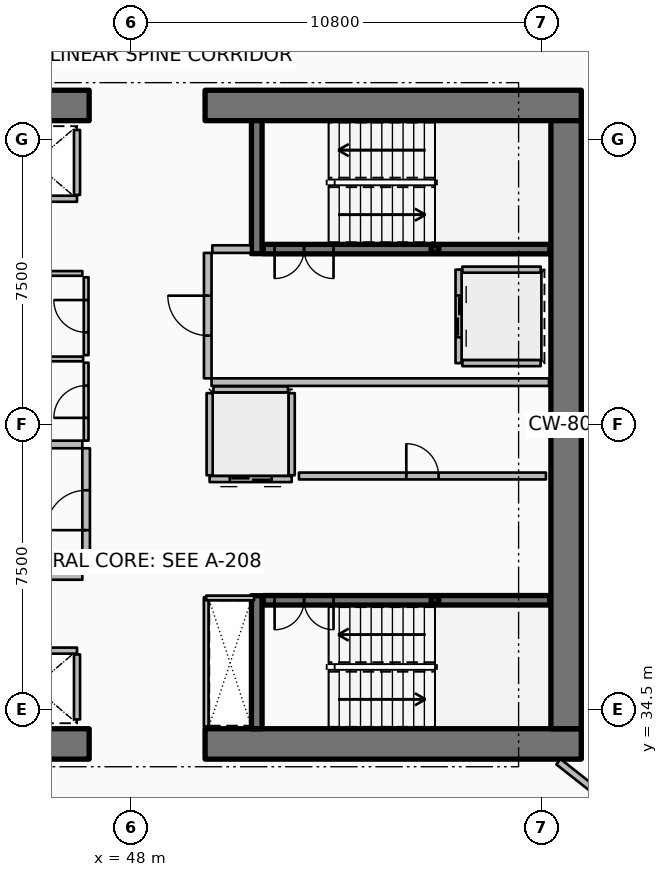
"""IFC4 building model, lengths in metres.
Left out: names, types, materials, properties, quantities, classifications, styles, units other than length and angle.
Written with IfcOpenShell. Run it as: python <this file> out.ifc"""

import sys

from ifc_helpers import new_model, si_unit, direction, frame, frame_2d, origin, origin_2d, place, context, subcontext, project, spatial, rectangle, hollow_rectangle, extrude, element, fill, save


model = new_model("IFC4")
c1 = context("Model", 3, precision=1e-05, world=origin(), true_north=direction((0.0, 1.0)))
c2 = subcontext(c1, "Body", "Model", "MODEL_VIEW")
j1 = project(units=[si_unit("LENGTHUNIT", "METRE"), si_unit("PLANEANGLEUNIT", "RADIAN")], contexts=[c1])
p1 = place(None, origin())
s1 = spatial("IfcSite", under=j1, at=p1, CompositionType="ELEMENT")
p2 = place(p1, origin())
s2 = spatial("IfcBuilding", under=s1, at=p2, CompositionType="ELEMENT")
p3 = place(p2, frame((0.0, 0.0, 131.55)))
s3 = spatial("IfcBuildingStorey", under=s2, at=p3, CompositionType="ELEMENT", Elevation=131.55)
p4 = place(p3, frame((37.0, 33.6, 0.0), z_axis=(0.0, 0.0, 1.0), x_axis=(1.0, 0.0, 0.0)))
e1 = element("IfcWall", 1, at=p4, inside=s3, PredefinedType="SHEAR", context=c2, shape_type="SweptSolid", body=[
    extrude(rectangle(XDim=9.9, YDim=0.8, at=frame_2d((4.95, 0.0))), origin(), (0.0, 0.0, 1.0), 3.75),
])
p5 = place(p3, frame((49.95, 33.6, 0.0), z_axis=(0.0, 0.0, 1.0), x_axis=(1.0, 0.0, 0.0)))
e2 = element("IfcWall", 2, at=p5, inside=s3, PredefinedType="SHEAR", context=c2, shape_type="SweptSolid", body=[
    extrude(rectangle(XDim=9.9, YDim=0.8, at=frame_2d((4.95, 0.0))), origin(), (0.0, 0.0, 1.0), 3.75),
])
p6 = place(p3, frame((37.0, 50.4, 0.0), z_axis=(0.0, 0.0, 1.0), x_axis=(1.0, 0.0, 0.0)))
e3 = element("IfcWall", 3, at=p6, inside=s3, PredefinedType="SHEAR", context=c2, shape_type="SweptSolid", body=[
    extrude(rectangle(XDim=9.9, YDim=0.8, at=frame_2d((4.95, 0.0))), origin(), (0.0, 0.0, 1.0), 3.75),
])
p7 = place(p3, frame((49.95, 50.4, 0.0), z_axis=(0.0, 0.0, 1.0), x_axis=(1.0, 0.0, 0.0)))
e4 = element("IfcWall", 4, at=p7, inside=s3, PredefinedType="SHEAR", context=c2, shape_type="SweptSolid", body=[
    extrude(rectangle(XDim=9.9, YDim=0.8, at=frame_2d((4.95, 0.0))), origin(), (0.0, 0.0, 1.0), 3.75),
])
p8 = place(p3, frame((59.45, 34.0, 0.0), z_axis=(0.0, 0.0, 1.0), x_axis=(0.0, 1.0, 0.0)))
e5 = element("IfcWall", 5, at=p8, inside=s3, PredefinedType="SHEAR", context=c2, shape_type="SweptSolid", body=[
    extrude(rectangle(XDim=16.0, YDim=0.8, at=frame_2d((8.0, 0.0))), origin(), (0.0, 0.0, 1.0), 3.75),
])
for number, where, z_axis, x_axis in (
    (6, (51.31, 46.5, 0.0), (0.0, 0.0, 1.0), (0.0, 1.0, 0.0)),
    (7, (51.31, 34.0, 0.0), (0.0, 0.0, 1.0), (0.0, 1.0, 0.0)),
):
    element("IfcWall", number, at=place(p3, frame(where, z_axis=z_axis, x_axis=x_axis)), inside=s3, PredefinedType="SHEAR", context=c2, shape_type="SweptSolid", body=[
        extrude(rectangle(XDim=3.5, YDim=0.28, at=frame_2d((1.75, 0.0))), origin(), (0.0, 0.0, 1.0), 3.75),
    ])
for number, where, z_axis, x_axis in (
    (8, (56.0, 46.62, 0.0), (0.0, 0.0, 1.0), (1.0, 0.0, 0.0)),
    (9, (56.0, 37.38, 0.0), (0.0, 0.0, 1.0), (1.0, 0.0, 0.0)),
):
    element("IfcColumn", number, at=place(p3, frame(where, z_axis=z_axis, x_axis=x_axis)), inside=s3, PredefinedType="COLUMN", context=c2, shape_type="SweptSolid", body=[
        extrude(hollow_rectangle(XDim=0.2, YDim=0.2, WallThickness=0.01, InnerFilletRadius=0.01, OuterFilletRadius=0.02, at=origin_2d()), origin(), (0.0, 0.0, 1.0), 1.67),
    ])
p9 = place(p3, frame((51.48, 46.62, 0.0), z_axis=(0.0, 0.0, 1.0), x_axis=(1.0, 0.0, 0.0)))
e10 = element("IfcWall", 10, at=p9, inside=s3, PredefinedType="SOLIDWALL", context=c2, shape_type="SweptSolid", body=[
    extrude(rectangle(XDim=7.54, YDim=0.25, at=frame_2d((3.77, 0.0))), origin(), (0.0, 0.0, 1.0), 3.5),
])
p10 = place(p9, frame((0.3, 0.0, 0.0)))
e11 = element("IfcOpeningElement", 11, at=p10, cuts=e10, PredefinedType="OPENING", context=c2, shape_type="SweptSolid", body=[
    extrude(rectangle(XDim=1.55, YDim=2.15, at=frame_2d((0.775, 1.075))), frame((0.0, 0.135, 0.0), z_axis=(0.0, -1.0, 0.0), x_axis=(1.0, 0.0, 0.0)), (0.0, 0.0, 1.0), 0.27),
])
p11 = place(p3, frame((51.48, 37.38, 0.0), z_axis=(0.0, 0.0, 1.0), x_axis=(1.0, 0.0, 0.0)))
e12 = element("IfcWall", 12, at=p11, inside=s3, PredefinedType="SOLIDWALL", context=c2, shape_type="SweptSolid", body=[
    extrude(rectangle(XDim=7.54, YDim=0.25, at=frame_2d((3.77, 0.0))), origin(), (0.0, 0.0, 1.0), 3.5),
])
p12 = place(p11, frame((0.3, 0.0, 0.0)))
e13 = element("IfcOpeningElement", 13, at=p12, cuts=e12, PredefinedType="OPENING", context=c2, shape_type="SweptSolid", body=[
    extrude(rectangle(XDim=1.55, YDim=2.15, at=frame_2d((0.775, 1.075))), frame((0.0, 0.135, 0.0), z_axis=(0.0, -1.0, 0.0), x_axis=(1.0, 0.0, 0.0)), (0.0, 0.0, 1.0), 0.27),
])
p13 = place(p3, frame((46.58, 47.945, 0.0), z_axis=(0.0, 0.0, 1.0), x_axis=(-1.0, 0.0, 0.0)))
e14 = element("IfcWall", 14, at=p13, inside=s3, PredefinedType="PARTITIONING", context=c2, shape_type="SweptSolid", body=[
    extrude(rectangle(XDim=2.26, YDim=0.16, at=frame_2d((1.13, 0.0))), origin(), (0.0, 0.0, 1.0), 3.5),
])
p14 = place(p3, frame((46.58, 48.045, 0.0), z_axis=(0.0, 0.0, 1.0), x_axis=(0.0, 1.0, 0.0)))
e15 = element("IfcWall", 15, at=p14, inside=s3, PredefinedType="PARTITIONING", context=c2, shape_type="SweptSolid", body=[
    extrude(rectangle(XDim=1.71, YDim=0.16, at=frame_2d((0.855, 0.0))), origin(), (0.0, 0.0, 1.0), 3.5),
])
p15 = place(p3, frame((44.32, 36.055, 0.0), z_axis=(0.0, 0.0, 1.0), x_axis=(1.0, 0.0, 0.0)))
e16 = element("IfcWall", 16, at=p15, inside=s3, PredefinedType="PARTITIONING", context=c2, shape_type="SweptSolid", body=[
    extrude(rectangle(XDim=2.26, YDim=0.16, at=frame_2d((1.13, 0.0))), origin(), (0.0, 0.0, 1.0), 3.5),
])
p16 = place(p3, frame((46.58, 34.245, 0.0), z_axis=(0.0, 0.0, 1.0), x_axis=(0.0, 1.0, 0.0)))
e17 = element("IfcWall", 17, at=p16, inside=s3, PredefinedType="PARTITIONING", context=c2, shape_type="SweptSolid", body=[
    extrude(rectangle(XDim=1.71, YDim=0.16, at=frame_2d((0.855, 0.0))), origin(), (0.0, 0.0, 1.0), 3.5),
])
p17 = place(p3, frame((56.62, 46.08, 0.0), z_axis=(0.0, 0.0, 1.0), x_axis=(0.0, -1.0, 0.0)))
e18 = element("IfcWall", 18, at=p17, inside=s3, PredefinedType="PARTITIONING", context=c2, shape_type="SweptSolid", body=[
    extrude(rectangle(XDim=2.46, YDim=0.16, at=frame_2d((1.23, 0.0))), origin(), (0.0, 0.0, 1.0), 3.5),
])
p18 = place(p17, frame((0.68, 0.0, 0.0)))
e19 = element("IfcOpeningElement", 19, at=p18, cuts=e18, PredefinedType="OPENING", context=c2, shape_type="SweptSolid", body=[
    extrude(rectangle(XDim=1.1, YDim=2.1, at=frame_2d((0.55, 1.05))), frame((0.0, 0.09, 0.0), z_axis=(0.0, -1.0, 0.0), x_axis=(1.0, 0.0, 0.0)), (0.0, 0.0, 1.0), 0.18),
])
for number, where, z_axis, x_axis in (
    (20, (56.72, 46.08, 0.0), (0.0, 0.0, 1.0), (1.0, 0.0, 0.0)),
    (21, (56.72, 43.62, 0.0), (0.0, 0.0, 1.0), (1.0, 0.0, 0.0)),
):
    element("IfcWall", number, at=place(p3, frame(where, z_axis=z_axis, x_axis=x_axis)), inside=s3, PredefinedType="PARTITIONING", context=c2, shape_type="SweptSolid", body=[
        extrude(rectangle(XDim=2.06, YDim=0.16, at=frame_2d((1.03, 0.0))), origin(), (0.0, 0.0, 1.0), 3.5),
    ])
p19 = place(p3, frame((52.23, 40.57, 0.0), z_axis=(0.0, 0.0, 1.0), x_axis=(-1.0, 0.0, 0.0)))
e22 = element("IfcWall", 22, at=p19, inside=s3, PredefinedType="PARTITIONING", context=c2, shape_type="SweptSolid", body=[
    extrude(rectangle(XDim=2.16, YDim=0.16, at=frame_2d((1.08, 0.0))), origin(), (0.0, 0.0, 1.0), 3.5),
])
p20 = place(p19, frame((0.53, 0.0, 0.0)))
e23 = element("IfcOpeningElement", 23, at=p20, cuts=e22, PredefinedType="OPENING", context=c2, shape_type="SweptSolid", body=[
    extrude(rectangle(XDim=1.1, YDim=2.1, at=frame_2d((0.55, 1.05))), frame((0.0, 0.09, 0.0), z_axis=(0.0, -1.0, 0.0), x_axis=(1.0, 0.0, 0.0)), (0.0, 0.0, 1.0), 0.18),
])
for number, where, z_axis, x_axis in (
    (24, (52.23, 40.67, 0.0), (0.0, 0.0, 1.0), (0.0, 1.0, 0.0)),
    (25, (50.07, 40.67, 0.0), (0.0, 0.0, 1.0), (0.0, 1.0, 0.0)),
):
    element("IfcWall", number, at=place(p3, frame(where, z_axis=z_axis, x_axis=x_axis)), inside=s3, PredefinedType="PARTITIONING", context=c2, shape_type="SweptSolid", body=[
        extrude(rectangle(XDim=2.16, YDim=0.16, at=frame_2d((1.08, 0.0))), origin(), (0.0, 0.0, 1.0), 3.5),
    ])
p21 = place(p3, frame((50.17, 42.93, 0.0), z_axis=(0.0, 0.0, 1.0), x_axis=(1.0, 0.0, 0.0)))
e26 = element("IfcWall", 26, at=p21, inside=s3, PredefinedType="PARTITIONING", context=c2, shape_type="SweptSolid", body=[
    extrude(rectangle(XDim=1.96, YDim=0.16, at=frame_2d((0.98, 0.0))), origin(), (0.0, 0.0, 1.0), 3.5),
])
p22 = place(p3, frame((52.42, 40.65, 0.0), z_axis=(0.0, 0.0, 1.0), x_axis=(1.0, 0.0, 0.0)))
e27 = element("IfcWall", 27, at=p22, inside=s3, PredefinedType="PARTITIONING", context=c2, shape_type="SweptSolid", body=[
    extrude(rectangle(XDim=6.5, YDim=0.18, at=frame_2d((3.25, 0.0))), origin(), (0.0, 0.0, 1.0), 3.5),
])
p23 = place(p22, frame((2.825, 0.0, 0.0)))
e28 = element("IfcOpeningElement", 28, at=p23, cuts=e27, PredefinedType="OPENING", context=c2, shape_type="SweptSolid", body=[
    extrude(rectangle(XDim=0.85, YDim=2.06, at=frame_2d((0.425, 1.03))), frame((0.0, 0.1, 0.0), z_axis=(0.0, -1.0, 0.0), x_axis=(1.0, 0.0, 0.0)), (0.0, 0.0, 1.0), 0.2),
])
p24 = place(p3, frame((41.35, 38.02, 0.0), z_axis=(0.0, 0.0, 1.0), x_axis=(1.0, 0.0, 0.0)))
e29 = element("IfcWall", 29, at=p24, inside=s3, PredefinedType="PARTITIONING", context=c2, shape_type="SweptSolid", body=[
    extrude(rectangle(XDim=5.37, YDim=0.2, at=frame_2d((2.685, 0.0))), origin(), (0.0, 0.0, 1.0), 3.5),
])
p25 = place(p3, frame((43.92, 41.48, 0.0), z_axis=(0.0, 0.0, 1.0), x_axis=(1.0, 0.0, 0.0)))
e30 = element("IfcWall", 30, at=p25, inside=s3, PredefinedType="PARTITIONING", context=c2, shape_type="SweptSolid", body=[
    extrude(rectangle(XDim=2.8, YDim=0.2, at=frame_2d((1.4, 0.0))), origin(), (0.0, 0.0, 1.0), 3.5),
])
p26 = place(p3, frame((46.82, 38.12, 0.0), z_axis=(0.0, 0.0, 1.0), x_axis=(0.0, 1.0, 0.0)))
e31 = element("IfcWall", 31, at=p26, inside=s3, PredefinedType="PARTITIONING", context=c2, shape_type="SweptSolid", body=[
    extrude(rectangle(XDim=3.26, YDim=0.2, at=frame_2d((1.63, 0.0))), origin(), (0.0, 0.0, 1.0), 3.5),
])
p27 = place(p26, frame((1.105, 0.0, 0.0)))
e32 = element("IfcOpeningElement", 32, at=p27, cuts=e31, PredefinedType="OPENING", context=c2, shape_type="SweptSolid", body=[
    extrude(rectangle(XDim=1.05, YDim=2.1, at=frame_2d((0.525, 1.05))), frame((0.0, 0.11, 0.0), z_axis=(0.0, -1.0, 0.0), x_axis=(1.0, 0.0, 0.0)), (0.0, 0.0, 1.0), 0.22),
])
p28 = place(p3, frame((50.12, 43.12, 0.0), z_axis=(0.0, 0.0, 1.0), x_axis=(1.0, 0.0, 0.0)))
e33 = element("IfcWall", 33, at=p28, inside=s3, PredefinedType="PARTITIONING", context=c2, shape_type="SweptSolid", body=[
    extrude(rectangle(XDim=8.88, YDim=0.2, at=frame_2d((4.44, 0.0))), origin(), (0.0, 0.0, 1.0), 3.5),
])
p29 = place(p3, frame((50.14, 46.62, 0.0), z_axis=(0.0, 0.0, 1.0), x_axis=(1.0, 0.0, 0.0)))
e34 = element("IfcWall", 34, at=p29, inside=s3, PredefinedType="PARTITIONING", context=c2, shape_type="SweptSolid", body=[
    extrude(rectangle(XDim=1.02, YDim=0.2, at=frame_2d((0.51, 0.0))), origin(), (0.0, 0.0, 1.0), 3.5),
])
p30 = place(p3, frame((50.02, 43.22, 0.0), z_axis=(0.0, 0.0, 1.0), x_axis=(0.0, 1.0, 0.0)))
e35 = element("IfcWall", 35, at=p30, inside=s3, PredefinedType="PARTITIONING", context=c2, shape_type="SweptSolid", body=[
    extrude(rectangle(XDim=3.3, YDim=0.2, at=frame_2d((1.65, 0.0))), origin(), (0.0, 0.0, 1.0), 3.5),
])
p31 = place(p30, frame((1.125, 0.0, 0.0)))
e36 = element("IfcOpeningElement", 36, at=p31, cuts=e35, PredefinedType="OPENING", context=c2, shape_type="SweptSolid", body=[
    extrude(rectangle(XDim=1.05, YDim=2.1, at=frame_2d((0.525, 1.05))), frame((0.0, 0.11, 0.0), z_axis=(0.0, -1.0, 0.0), x_axis=(1.0, 0.0, 0.0)), (0.0, 0.0, 1.0), 0.22),
])
p32 = place(p3, frame((41.36, 45.98, 0.0), z_axis=(0.0, 0.0, 1.0), x_axis=(1.0, 0.0, 0.0)))
e37 = element("IfcWall", 37, at=p32, inside=s3, PredefinedType="PARTITIONING", context=c2, shape_type="SweptSolid", body=[
    extrude(rectangle(XDim=5.36, YDim=0.125, at=frame_2d((2.68, 0.0))), origin(), (0.0, 0.0, 1.0), 2.94),
])
p33 = place(p3, frame((49.98, 34.06, 0.0), z_axis=(0.0, 0.0, 1.0), x_axis=(0.0, 1.0, 0.0)))
e38 = element("IfcWall", 38, at=p33, inside=s3, PredefinedType="PARTITIONING", context=c2, shape_type="SweptSolid", body=[
    extrude(rectangle(XDim=3.4, YDim=0.125, at=frame_2d((1.7, 0.0))), origin(), (0.0, 0.0, 1.0), 2.94),
])
p34 = place(p3, frame((49.98, 37.44, 0.0), z_axis=(0.0, 0.0, 1.0), x_axis=(1.0, 0.0, 0.0)))
e39 = element("IfcWall", 39, at=p34, inside=s3, PredefinedType="PARTITIONING", context=c2, shape_type="SweptSolid", body=[
    extrude(rectangle(XDim=1.26, YDim=0.125, at=frame_2d((0.63, 0.0))), origin(), (0.0, 0.0, 1.0), 2.94),
])
p35 = place(p3, frame((44.03, 43.73, 0.0), z_axis=(0.0, 0.0, 1.0), x_axis=(1.0, 0.0, 0.0)))
e40 = element("IfcWall", 40, at=p35, inside=s3, PredefinedType="PARTITIONING", context=c2, shape_type="SweptSolid", body=[
    extrude(rectangle(XDim=2.71, YDim=0.125, at=frame_2d((1.355, 0.0))), origin(), (0.0, 0.0, 1.0), 2.94),
])
p36 = place(p3, frame((46.82, 41.58, 0.0), z_axis=(0.0, 0.0, 1.0), x_axis=(0.0, 1.0, 0.0)))
e41 = element("IfcWall", 41, at=p36, inside=s3, PredefinedType="PARTITIONING", context=c2, shape_type="SweptSolid", body=[
    extrude(rectangle(XDim=2.05, YDim=0.125, at=frame_2d((1.025, 0.0))), origin(), (0.0, 0.0, 1.0), 2.94),
])
p37 = place(p36, frame((0.6, 0.0, 0.0)))
e42 = element("IfcOpeningElement", 42, at=p37, cuts=e41, PredefinedType="OPENING", context=c2, shape_type="SweptSolid", body=[
    extrude(rectangle(XDim=0.85, YDim=2.06, at=frame_2d((0.425, 1.03))), frame((0.0, 0.073, 0.0), z_axis=(0.0, -1.0, 0.0), x_axis=(1.0, 0.0, 0.0)), (0.0, 0.0, 1.0), 0.145),
])
p38 = place(p3, frame((46.82, 43.83, 0.0), z_axis=(0.0, 0.0, 1.0), x_axis=(0.0, 1.0, 0.0)))
e43 = element("IfcWall", 43, at=p38, inside=s3, PredefinedType="PARTITIONING", context=c2, shape_type="SweptSolid", body=[
    extrude(rectangle(XDim=2.05, YDim=0.125, at=frame_2d((1.025, 0.0))), origin(), (0.0, 0.0, 1.0), 2.94),
])
p39 = place(p38, frame((0.6, 0.0, 0.0)))
e44 = element("IfcOpeningElement", 44, at=p39, cuts=e43, PredefinedType="OPENING", context=c2, shape_type="SweptSolid", body=[
    extrude(rectangle(XDim=0.85, YDim=2.06, at=frame_2d((0.425, 1.03))), frame((0.0, 0.073, 0.0), z_axis=(0.0, -1.0, 0.0), x_axis=(1.0, 0.0, 0.0)), (0.0, 0.0, 1.0), 0.145),
])
p40 = place(p3, frame((59.249, 33.132, 0.0), z_axis=(0.0, 0.0, 1.0), x_axis=(0.785334414621, -0.619071770647, 0.0)))
e45 = element("IfcWall", 45, at=p40, inside=s3, PredefinedType="PARTITIONING", context=c2, shape_type="SweptSolid", body=[
    extrude(rectangle(XDim=9.515, YDim=0.18, at=frame_2d((4.758, 0.0))), origin(), (0.0, 0.0, 1.0), 2.94),
])
p41 = place(p10, origin())
e46 = element("IfcDoor", 46, at=p41, inside=s3, OperationType="DOUBLE_DOOR_SINGLE_SWING", PredefinedType="DOOR", context=c2, shape_type="SweptSolid", body=[
    extrude(rectangle(XDim=1.55, YDim=2.15, at=frame_2d((0.775, 1.075))), frame((0.0, 0.025, 0.0), z_axis=(0.0, -1.0, 0.0), x_axis=(1.0, 0.0, 0.0)), (0.0, 0.0, 1.0), 0.05),
])
fill(e11, e46)
p42 = place(p12, origin())
e47 = element("IfcDoor", 47, at=p42, inside=s3, OperationType="DOUBLE_DOOR_SINGLE_SWING", PredefinedType="DOOR", context=c2, shape_type="SweptSolid", body=[
    extrude(rectangle(XDim=1.55, YDim=2.15, at=frame_2d((0.775, 1.075))), frame((0.0, 0.025, 0.0), z_axis=(0.0, -1.0, 0.0), x_axis=(1.0, 0.0, 0.0)), (0.0, 0.0, 1.0), 0.05),
])
fill(e13, e47)
p43 = place(p18, origin())
e48 = element("IfcDoor", 48, at=p43, inside=s3, OperationType="DOUBLE_DOOR_SLIDING", PredefinedType="DOOR", context=c2, shape_type="SweptSolid", body=[
    extrude(rectangle(XDim=1.1, YDim=2.1, at=frame_2d((0.55, 1.05))), frame((0.0, 0.025, 0.0), z_axis=(0.0, -1.0, 0.0), x_axis=(1.0, 0.0, 0.0)), (0.0, 0.0, 1.0), 0.05),
])
fill(e19, e48)
p44 = place(p20, origin())
e49 = element("IfcDoor", 49, at=p44, inside=s3, OperationType="DOUBLE_DOOR_SLIDING", PredefinedType="DOOR", context=c2, shape_type="SweptSolid", body=[
    extrude(rectangle(XDim=1.1, YDim=2.1, at=frame_2d((0.55, 1.05))), frame((0.0, 0.025, 0.0), z_axis=(0.0, -1.0, 0.0), x_axis=(1.0, 0.0, 0.0)), (0.0, 0.0, 1.0), 0.05),
])
fill(e23, e49)
p45 = place(p23, origin())
e50 = element("IfcDoor", 50, at=p45, inside=s3, OperationType="SINGLE_SWING_LEFT", PredefinedType="DOOR", context=c2, shape_type="SweptSolid", body=[
    extrude(rectangle(XDim=0.85, YDim=2.06, at=frame_2d((0.425, 1.03))), frame((0.0, 0.025, 0.0), z_axis=(0.0, -1.0, 0.0), x_axis=(1.0, 0.0, 0.0)), (0.0, 0.0, 1.0), 0.05),
])
fill(e28, e50)
p46 = place(p27, origin())
e51 = element("IfcDoor", 51, at=p46, inside=s3, OperationType="SINGLE_SWING_LEFT", PredefinedType="DOOR", context=c2, shape_type="SweptSolid", body=[
    extrude(rectangle(XDim=1.05, YDim=2.1, at=frame_2d((0.525, 1.05))), frame((0.0, 0.025, 0.0), z_axis=(0.0, -1.0, 0.0), x_axis=(1.0, 0.0, 0.0)), (0.0, 0.0, 1.0), 0.05),
])
fill(e32, e51)
p47 = place(p31, origin())
e52 = element("IfcDoor", 52, at=p47, inside=s3, OperationType="SINGLE_SWING_RIGHT", PredefinedType="DOOR", context=c2, shape_type="SweptSolid", body=[
    extrude(rectangle(XDim=1.05, YDim=2.1, at=frame_2d((0.525, 1.05))), frame((0.0, 0.025, 0.0), z_axis=(0.0, -1.0, 0.0), x_axis=(1.0, 0.0, 0.0)), (0.0, 0.0, 1.0), 0.05),
])
fill(e36, e52)
p48 = place(p37, origin())
e53 = element("IfcDoor", 53, at=p48, inside=s3, OperationType="SINGLE_SWING_LEFT", PredefinedType="DOOR", context=c2, shape_type="SweptSolid", body=[
    extrude(rectangle(XDim=0.85, YDim=2.06, at=frame_2d((0.425, 1.03))), frame((0.0, 0.025, 0.0), z_axis=(0.0, -1.0, 0.0), x_axis=(1.0, 0.0, 0.0)), (0.0, 0.0, 1.0), 0.05),
])
fill(e42, e53)
p49 = place(p39, origin())
e54 = element("IfcDoor", 54, at=p49, inside=s3, OperationType="SINGLE_SWING_RIGHT", PredefinedType="DOOR", context=c2, shape_type="SweptSolid", body=[
    extrude(rectangle(XDim=0.85, YDim=2.06, at=frame_2d((0.425, 1.03))), frame((0.0, 0.025, 0.0), z_axis=(0.0, -1.0, 0.0), x_axis=(1.0, 0.0, 0.0)), (0.0, 0.0, 1.0), 0.05),
])
fill(e44, e54)
save(model, sys.argv[1])
